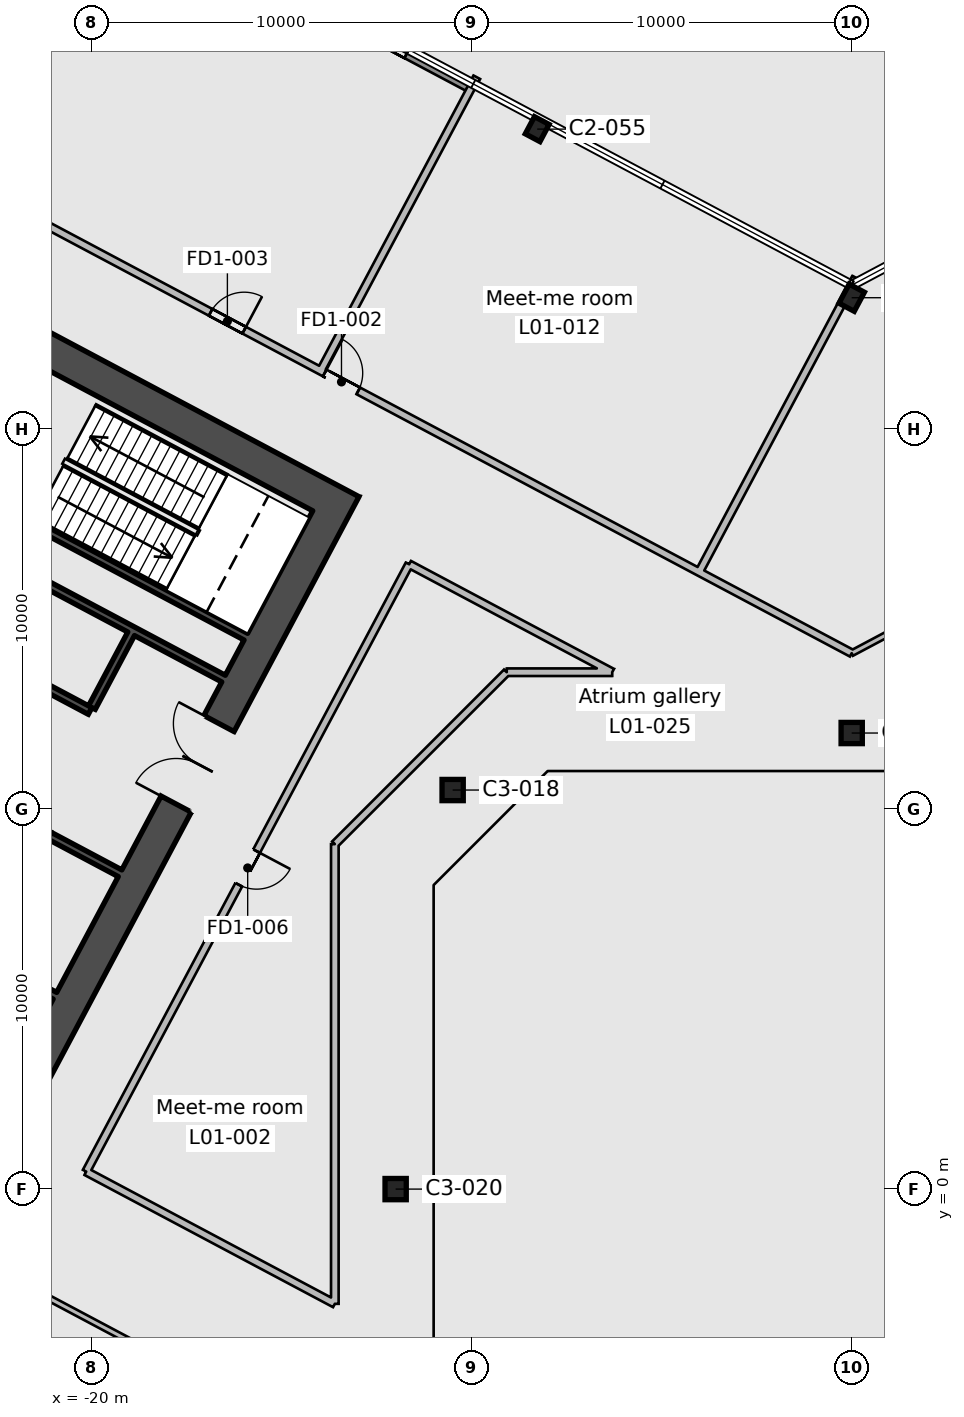
"""IFC4 building model, lengths in metres.
Left out: names, types, materials, properties, quantities, classifications, styles, units other than length and angle.
Written with IfcOpenShell. Run it as: python <this file> out.ifc"""

import sys

from ifc_helpers import new_model, si_unit, direction, frame, frame_2d, origin, origin_2d, place, context, subcontext, project, spatial, rectangle, hollow_rectangle, i_section, extrude, element, fill, save


model = new_model("IFC4")
c1 = context("Model", 3, precision=1e-05, world=origin(), true_north=direction((0.0, 1.0)))
c2 = subcontext(c1, "Body", "Model", "MODEL_VIEW")
j1 = project(units=[si_unit("LENGTHUNIT", "METRE"), si_unit("PLANEANGLEUNIT", "RADIAN")], contexts=[c1])
p1 = place(None, origin())
s1 = spatial("IfcSite", under=j1, at=p1, CompositionType="ELEMENT")
p2 = place(p1, origin())
s2 = spatial("IfcBuilding", under=s1, at=p2, CompositionType="ELEMENT")
p3 = place(p2, frame((0.0, 0.0, 7.0)))
s3 = spatial("IfcBuildingStorey", under=s2, at=p3, CompositionType="ELEMENT", Elevation=7.0)
for number, where, z_axis, x_axis in (
    (1, (-12.0, 0.0, 0.0), (0.0, 0.0, 1.0), (1.0, 0.0, 0.0)),
    (2, (-10.5, 10.5, 0.0), (0.0, 0.0, 1.0), (1.0, 0.0, 0.0)),
    (3, (0.0, 12.0, 0.0), (0.0, 0.0, 1.0), (1.0, 0.0, 0.0)),
):
    element("IfcColumn", number, at=place(p3, frame(where, z_axis=z_axis, x_axis=x_axis)), inside=s3, PredefinedType="COLUMN", context=c2, shape_type="SweptSolid", body=[
        extrude(hollow_rectangle(XDim=0.559, YDim=0.559, WallThickness=0.024, InnerFilletRadius=0.012, OuterFilletRadius=0.035, at=origin_2d()), origin(), (0.0, 0.0, 1.0), 5.2),
    ])
p4 = place(p3, frame((0.0, 23.454, 0.0), z_axis=(0.0, 0.0, 1.0), x_axis=(-0.882947592859, 0.469471562786, 0.0)))
e4 = element("IfcColumn", 4, at=p4, inside=s3, PredefinedType="COLUMN", context=c2, shape_type="SweptSolid", body=[
    extrude(i_section(OverallWidth=0.455, OverallDepth=0.569, WebThickness=0.078, FlangeThickness=0.125, FilletRadius=0.015, at=origin_2d()), origin(), (0.0, 0.0, 1.0), 5.2),
])
p5 = place(p3, frame((-8.275, 27.89, 0.0), z_axis=(0.0, 0.0, 1.0), x_axis=(-0.882947592859, 0.469471562786, 0.0)))
e5 = element("IfcColumn", 5, at=p5, inside=s3, PredefinedType="COLUMN", context=c2, shape_type="SweptSolid", body=[
    extrude(i_section(OverallWidth=0.437, OverallDepth=0.513, WebThickness=0.061, FlangeThickness=0.097, FilletRadius=0.015, at=origin_2d()), origin(), (0.0, 0.0, 1.0), 5.2),
])
p6 = place(p3, frame((-13.362, 18.43, 0.0), z_axis=(0.0, 0.0, 1.0), x_axis=(-0.46947084998, -0.882947971864, 0.0)))
e6 = element("IfcWall", 6, at=p6, inside=s3, PredefinedType="SHEAR", context=c2, shape_type="SweptSolid", body=[
    extrude(rectangle(XDim=20.0, YDim=0.9, at=frame_2d((10.0, 0.0))), origin(), (0.0, 0.0, 1.0), 5.2),
])
p7 = place(p6, frame((7.0, 0.0, 0.0)))
e7 = element("IfcOpeningElement", 7, at=p7, cuts=e6, PredefinedType="OPENING", context=c2, shape_type="SweptSolid", body=[
    extrude(rectangle(XDim=2.4, YDim=2.4, at=frame_2d((1.2, 1.2))), frame((0.0, 0.46, 0.0), z_axis=(0.0, -1.0, 0.0), x_axis=(1.0, 0.0, 0.0)), (0.0, 0.0, 1.0), 0.92),
])
p8 = place(p3, frame((-13.97, 18.244, 0.0), z_axis=(0.0, 0.0, 1.0), x_axis=(-0.88294509198, 0.469476266226, 0.0)))
e8 = element("IfcWall", 8, at=p8, inside=s3, PredefinedType="SHEAR", context=c2, shape_type="SweptSolid", body=[
    extrude(rectangle(XDim=20.2, YDim=0.9, at=frame_2d((10.1, 0.0))), origin(), (0.0, 0.0, 1.0), 5.2),
])
p9 = place(p3, frame((-18.96, 14.611, 0.0), z_axis=(0.0, 0.0, 1.0), x_axis=(-0.4694473164, -0.882960484464, 0.0)))
e9 = element("IfcWall", 9, at=p9, inside=s3, PredefinedType="SHEAR", context=c2, shape_type="SweptSolid", body=[
    extrude(rectangle(XDim=2.2, YDim=0.2, at=frame_2d((1.1, 0.0))), origin(), (0.0, 0.0, 1.0), 5.2),
])
p10 = place(p3, frame((-15.942, 14.536, 0.0), z_axis=(0.0, 0.0, 1.0), x_axis=(-0.882946947542, 0.469472776449, 0.0)))
e10 = element("IfcWall", 10, at=p10, inside=s3, PredefinedType="SHEAR", context=c2, shape_type="SweptSolid", body=[
    extrude(rectangle(XDim=8.0, YDim=0.2, at=frame_2d((4.0, 0.0))), origin(), (0.0, 0.0, 1.0), 5.2),
])
p11 = place(p3, frame((-16.529, 13.432, 0.0), z_axis=(0.0, 0.0, 1.0), x_axis=(-0.88295287151, 0.469461634952, 0.0)))
e11 = element("IfcWall", 11, at=p11, inside=s3, PredefinedType="SHEAR", context=c2, shape_type="SweptSolid", body=[
    extrude(rectangle(XDim=8.0, YDim=0.2, at=frame_2d((4.0, 0.0))), origin(), (0.0, 0.0, 1.0), 5.2),
])
p12 = place(p3, frame((-20.04, 12.581, 0.0), z_axis=(0.0, 0.0, 1.0), x_axis=(-0.882942972946, 0.469480251476, 0.0)))
e12 = element("IfcWall", 12, at=p12, inside=s3, PredefinedType="SHEAR", context=c2, shape_type="SweptSolid", body=[
    extrude(rectangle(XDim=5.4, YDim=0.2, at=frame_2d((2.7, 0.0))), origin(), (0.0, 0.0, 1.0), 5.2),
])
p13 = place(p12, frame((2.25, 0.0, 0.0)))
e13 = element("IfcOpeningElement", 13, at=p13, cuts=e12, PredefinedType="OPENING", context=c2, shape_type="SweptSolid", body=[
    extrude(rectangle(XDim=0.9, YDim=2.1, at=frame_2d((0.45, 1.05))), frame((0.0, 0.11, 0.0), z_axis=(0.0, -1.0, 0.0), x_axis=(1.0, 0.0, 0.0)), (0.0, 0.0, 1.0), 0.22),
])
p14 = place(p3, frame((-19.252, 8.311, 0.0), z_axis=(0.0, 0.0, 1.0), x_axis=(-0.882955722218, 0.469456273365, 0.0)))
e14 = element("IfcWall", 14, at=p14, inside=s3, PredefinedType="SHEAR", context=c2, shape_type="SweptSolid", body=[
    extrude(rectangle(XDim=10.0, YDim=0.2, at=frame_2d((5.0, 0.0))), origin(), (0.0, 0.0, 1.0), 5.2),
])
p15 = place(p14, frame((2.1, 0.0, 0.0)))
e15 = element("IfcOpeningElement", 15, at=p15, cuts=e14, PredefinedType="OPENING", context=c2, shape_type="SweptSolid", body=[
    extrude(rectangle(XDim=1.2, YDim=2.1, at=frame_2d((0.6, 1.05))), frame((0.0, 0.11, 0.0), z_axis=(0.0, -1.0, 0.0), x_axis=(1.0, 0.0, 0.0)), (0.0, 0.0, 1.0), 0.22),
])
p16 = place(p3, frame((-20.965, 5.088, 0.0), z_axis=(0.0, 0.0, 1.0), x_axis=(-0.882925986334, 0.469512196493, 0.0)))
e16 = element("IfcWall", 16, at=p16, inside=s3, PredefinedType="SHEAR", context=c2, shape_type="SweptSolid", body=[
    extrude(rectangle(XDim=4.5, YDim=0.2, at=frame_2d((2.25, 0.0))), origin(), (0.0, 0.0, 1.0), 5.2),
])
p17 = place(p16, frame((0.6, 0.0, 0.0)))
e17 = element("IfcOpeningElement", 17, at=p17, cuts=e16, PredefinedType="OPENING", context=c2, shape_type="SweptSolid", body=[
    extrude(rectangle(XDim=1.1, YDim=2.1, at=frame_2d((0.55, 1.05))), frame((0.0, 0.11, 0.0), z_axis=(0.0, -1.0, 0.0), x_axis=(1.0, 0.0, 0.0)), (0.0, 0.0, 1.0), 0.22),
])
p18 = place(p3, frame((-10.017, 28.968, 0.0), z_axis=(0.0, 0.0, 1.0), x_axis=(-0.882941888563, 0.469482290849, 0.0)))
e18 = element("IfcWall", 18, at=p18, inside=s3, PredefinedType="STANDARD", context=c2, shape_type="SweptSolid", body=[
    extrude(rectangle(XDim=5.639, YDim=0.25, at=frame_2d((2.82, 0.0))), origin(), (0.0, 0.0, 1.0), 3.612),
])
p19 = place(p18, frame((1.919, 0.0, 0.0)))
e19 = element("IfcOpeningElement", 19, at=p19, cuts=e18, PredefinedType="OPENING", context=c2, shape_type="SweptSolid", body=[
    extrude(rectangle(XDim=1.8, YDim=2.4, at=frame_2d((0.9, 1.2))), frame((0.0, 0.135, 0.0), z_axis=(0.0, -1.0, 0.0), x_axis=(1.0, 0.0, 0.0)), (0.0, 0.0, 1.0), 0.27),
])
p20 = place(p3, frame((-13.6, -6.869, 0.0), z_axis=(0.0, 0.0, 1.0), x_axis=(-0.88295406426, 0.469459391648, 0.0)))
e20 = element("IfcWall", 20, at=p20, inside=s3, PredefinedType="PARTITIONING", context=c2, shape_type="SweptSolid", body=[
    extrude(rectangle(XDim=35.091, YDim=0.15, at=frame_2d((17.545, 0.0))), origin(), (0.0, 0.0, 1.0), 4.75),
])
p21 = place(p20, frame((25.75, 0.0, 0.0)))
e21 = element("IfcOpeningElement", 21, at=p21, cuts=e20, PredefinedType="OPENING", context=c2, shape_type="SweptSolid", body=[
    extrude(rectangle(XDim=1.0, YDim=2.1, at=frame_2d((0.5, 1.05))), frame((0.0, 0.085, 0.0), z_axis=(0.0, -1.0, 0.0), x_axis=(1.0, 0.0, 0.0)), (0.0, 0.0, 1.0), 0.17),
])
p22 = place(p20, frame((17.05, 0.0, 0.0)))
e22 = element("IfcOpeningElement", 22, at=p22, cuts=e20, PredefinedType="OPENING", context=c2, shape_type="SweptSolid", body=[
    extrude(rectangle(XDim=1.0, YDim=2.1, at=frame_2d((0.5, 1.05))), frame((0.0, 0.085, 0.0), z_axis=(0.0, -1.0, 0.0), x_axis=(1.0, 0.0, 0.0)), (0.0, 0.0, 1.0), 0.17),
])
p23 = place(p3, frame((-32.894, 31.59, 0.0), z_axis=(0.0, 0.0, 1.0), x_axis=(0.882948512555, -0.469469833085, 0.0)))
e23 = element("IfcWall", 23, at=p23, inside=s3, PredefinedType="PARTITIONING", context=c2, shape_type="SweptSolid", body=[
    extrude(rectangle(XDim=37.255, YDim=0.2, at=frame_2d((18.627, 0.0))), origin(), (0.0, 0.0, 1.0), 4.75),
])
p24 = place(p23, frame((21.55, 0.0, 0.0)))
e24 = element("IfcOpeningElement", 24, at=p24, cuts=e23, PredefinedType="OPENING", context=c2, shape_type="SweptSolid", body=[
    extrude(rectangle(XDim=1.0, YDim=2.1, at=frame_2d((0.5, 1.05))), frame((0.0, 0.11, 0.0), z_axis=(0.0, -1.0, 0.0), x_axis=(1.0, 0.0, 0.0)), (0.0, 0.0, 1.0), 0.22),
])
p25 = place(p23, frame((18.15, 0.0, 0.0)))
e25 = element("IfcOpeningElement", 25, at=p25, cuts=e23, PredefinedType="OPENING", context=c2, shape_type="SweptSolid", body=[
    extrude(rectangle(XDim=1.0, YDim=2.1, at=frame_2d((0.5, 1.05))), frame((0.0, 0.11, 0.0), z_axis=(0.0, -1.0, 0.0), x_axis=(1.0, 0.0, 0.0)), (0.0, 0.0, 1.0), 0.22),
])
p26 = place(p3, frame((0.0, 14.1, 0.0), z_axis=(0.0, 0.0, 1.0), x_axis=(0.882942713919, 0.469480738623, 0.0)))
e26 = element("IfcWall", 26, at=p26, inside=s3, PredefinedType="PARTITIONING", context=c2, shape_type="SweptSolid", body=[
    extrude(rectangle(XDim=36.591, YDim=0.15, at=frame_2d((18.296, 0.0))), origin(), (0.0, 0.0, 1.0), 4.75),
])
p27 = place(p26, frame((30.95, 0.0, 0.0)))
e27 = element("IfcOpeningElement", 27, at=p27, cuts=e26, PredefinedType="OPENING", context=c2, shape_type="SweptSolid", body=[
    extrude(rectangle(XDim=1.0, YDim=2.1, at=frame_2d((0.5, 1.05))), frame((0.0, 0.085, 0.0), z_axis=(0.0, -1.0, 0.0), x_axis=(1.0, 0.0, 0.0)), (0.0, 0.0, 1.0), 0.17),
])
p28 = place(p26, frame((20.45, 0.0, 0.0)))
e28 = element("IfcOpeningElement", 28, at=p28, cuts=e26, PredefinedType="OPENING", context=c2, shape_type="SweptSolid", body=[
    extrude(rectangle(XDim=1.0, YDim=2.1, at=frame_2d((0.5, 1.05))), frame((0.0, 0.085, 0.0), z_axis=(0.0, -1.0, 0.0), x_axis=(1.0, 0.0, 0.0)), (0.0, 0.0, 1.0), 0.17),
])
p29 = place(p26, frame((17.75, 0.0, 0.0)))
e29 = element("IfcOpeningElement", 29, at=p29, cuts=e26, PredefinedType="OPENING", context=c2, shape_type="SweptSolid", body=[
    extrude(rectangle(XDim=1.0, YDim=2.1, at=frame_2d((0.5, 1.05))), frame((0.0, 0.085, 0.0), z_axis=(0.0, -1.0, 0.0), x_axis=(1.0, 0.0, 0.0)), (0.0, 0.0, 1.0), 0.17),
])
p30 = place(p3, frame((-9.864, 29.255, 0.0), z_axis=(0.0, 0.0, 1.0), x_axis=(-0.469472759909, -0.882946956336, 0.0)))
e30 = element("IfcWall", 30, at=p30, inside=s3, PredefinedType="PARTITIONING", context=c2, shape_type="SweptSolid", body=[
    extrude(rectangle(XDim=8.75, YDim=0.2, at=frame_2d((4.375, 0.0))), origin(), (0.0, 0.0, 1.0), 4.75),
])
p31 = place(p3, frame((-20.142, 0.46, 0.0), z_axis=(0.0, 0.0, 1.0), x_axis=(0.469506937019, 0.882928783136, 0.0)))
e31 = element("IfcWall", 31, at=p31, inside=s3, PredefinedType="PARTITIONING", context=c2, shape_type="SweptSolid", body=[
    extrude(rectangle(XDim=18.1, YDim=0.2, at=frame_2d((9.05, 0.0))), origin(), (0.0, 0.0, 1.0), 4.75),
])
p32 = place(p31, frame((8.55, 0.0, 0.0)))
e32 = element("IfcOpeningElement", 32, at=p32, cuts=e31, PredefinedType="OPENING", context=c2, shape_type="SweptSolid", body=[
    extrude(rectangle(XDim=1.0, YDim=2.1, at=frame_2d((0.5, 1.05))), frame((0.0, 0.11, 0.0), z_axis=(0.0, -1.0, 0.0), x_axis=(1.0, 0.0, 0.0)), (0.0, 0.0, 1.0), 0.22),
])
p33 = place(p3, frame((-11.644, 16.441, 0.0), z_axis=(0.0, 0.0, 1.0), x_axis=(0.882853947977, -0.469647640834, 0.0)))
e33 = element("IfcWall", 33, at=p33, inside=s3, PredefinedType="PARTITIONING", context=c2, shape_type="SweptSolid", body=[
    extrude(rectangle(XDim=3.153, YDim=0.2, at=frame_2d((1.577, 0.0))), origin(), (0.0, 0.0, 1.0), 4.75),
])
p34 = place(p3, frame((-13.6, -3.019, 0.0), z_axis=(0.0, 0.0, 1.0), x_axis=(-0.882915984826, 0.469531004022, 0.0)))
e34 = element("IfcWall", 34, at=p34, inside=s3, PredefinedType="PARTITIONING", context=c2, shape_type="SweptSolid", body=[
    extrude(rectangle(XDim=7.409, YDim=0.2, at=frame_2d((3.705, 0.0))), origin(), (0.0, 0.0, 1.0), 4.75),
])
p35 = place(p3, frame((-13.6, 9.077, 0.0), z_axis=(0.0, 0.0, 1.0), x_axis=(0.0, -1.0, 0.0)))
e35 = element("IfcWall", 35, at=p35, inside=s3, PredefinedType="PARTITIONING", context=c2, shape_type="SweptSolid", body=[
    extrude(rectangle(XDim=12.096, YDim=0.2, at=frame_2d((6.048, 0.0))), origin(), (0.0, 0.0, 1.0), 4.75),
])
p36 = place(p3, frame((-13.6, 9.077, 0.0), z_axis=(0.0, 0.0, 1.0), x_axis=(0.707106781187, 0.707106781187, 0.0)))
e36 = element("IfcWall", 36, at=p36, inside=s3, PredefinedType="PARTITIONING", context=c2, shape_type="SweptSolid", body=[
    extrude(rectangle(XDim=6.397, YDim=0.2, at=frame_2d((3.198, 0.0))), origin(), (0.0, 0.0, 1.0), 4.75),
])
p37 = place(p3, frame((0.105, 23.984, 0.0), z_axis=(0.0, 0.0, 1.0), x_axis=(-0.469364726907, -0.883004390213, 0.0)))
e37 = element("IfcWall", 37, at=p37, inside=s3, PredefinedType="PARTITIONING", context=c2, shape_type="SweptSolid", body=[
    extrude(rectangle(XDim=8.775, YDim=0.2, at=frame_2d((4.388, 0.0))), origin(), (0.0, 0.0, 1.0), 4.75),
])
p38 = place(p3, frame((-6.301, 13.6, 0.0), z_axis=(0.0, 0.0, 1.0), x_axis=(-1.0, 0.0, 0.0)))
e38 = element("IfcWall", 38, at=p38, inside=s3, PredefinedType="PARTITIONING", context=c2, shape_type="SweptSolid", body=[
    extrude(rectangle(XDim=2.776, YDim=0.2, at=frame_2d((1.388, 0.0))), origin(), (0.0, 0.0, 1.0), 4.75),
])
p39 = place(p3, frame((-6.301, 13.6, 0.0), z_axis=(0.0, 0.0, 1.0), x_axis=(-0.883065539011, 0.469249671083, 0.0)))
e39 = element("IfcWall", 39, at=p39, inside=s3, PredefinedType="PARTITIONING", context=c2, shape_type="SweptSolid", body=[
    extrude(rectangle(XDim=2.898, YDim=0.2, at=frame_2d((1.449, 0.0))), origin(), (0.0, 0.0, 1.0), 4.75),
])
p40 = place(p7, frame((2.4, 0.0, 0.0), z_axis=(0.0, 0.0, 1.0), x_axis=(-1.0, 0.0, 0.0)))
e40 = element("IfcDoor", 40, at=p40, inside=s3, OperationType="DOUBLE_DOOR_SINGLE_SWING", PredefinedType="DOOR", context=c2, shape_type="SweptSolid", body=[
    extrude(rectangle(XDim=2.4, YDim=2.4, at=frame_2d((1.2, 1.2))), frame((0.0, 0.025, 0.0), z_axis=(0.0, -1.0, 0.0), x_axis=(1.0, 0.0, 0.0)), (0.0, 0.0, 1.0), 0.05),
])
fill(e7, e40)
p41 = place(p19, frame((1.8, 0.0, 0.0), z_axis=(0.0, 0.0, 1.0), x_axis=(-1.0, 0.0, 0.0)))
e41 = element("IfcDoor", 41, at=p41, inside=s3, OperationType="DOUBLE_DOOR_SINGLE_SWING", PredefinedType="DOOR", context=c2, shape_type="SweptSolid", body=[
    extrude(rectangle(XDim=1.8, YDim=2.4, at=frame_2d((0.9, 1.2))), frame((0.0, 0.025, 0.0), z_axis=(0.0, -1.0, 0.0), x_axis=(1.0, 0.0, 0.0)), (0.0, 0.0, 1.0), 0.05),
])
fill(e19, e41)
p42 = place(p32, frame((1.0, 0.0, 0.0), z_axis=(0.0, 0.0, 1.0), x_axis=(-1.0, 0.0, 0.0)))
e42 = element("IfcDoor", 42, at=p42, inside=s3, OperationType="SINGLE_SWING_LEFT", PredefinedType="DOOR", context=c2, shape_type="SweptSolid", body=[
    extrude(rectangle(XDim=1.0, YDim=2.1, at=frame_2d((0.5, 1.05))), frame((0.0, 0.025, 0.0), z_axis=(0.0, -1.0, 0.0), x_axis=(1.0, 0.0, 0.0)), (0.0, 0.0, 1.0), 0.05),
])
fill(e32, e42)
p43 = place(p24, origin())
e43 = element("IfcDoor", 43, at=p43, inside=s3, OperationType="SINGLE_SWING_LEFT", PredefinedType="DOOR", context=c2, shape_type="SweptSolid", body=[
    extrude(rectangle(XDim=1.0, YDim=2.1, at=frame_2d((0.5, 1.05))), frame((0.0, 0.025, 0.0), z_axis=(0.0, -1.0, 0.0), x_axis=(1.0, 0.0, 0.0)), (0.0, 0.0, 1.0), 0.05),
])
fill(e24, e43)
p44 = place(p25, origin())
e44 = element("IfcDoor", 44, at=p44, inside=s3, OperationType="SINGLE_SWING_RIGHT", PredefinedType="DOOR", context=c2, shape_type="SweptSolid", body=[
    extrude(rectangle(XDim=1.0, YDim=2.1, at=frame_2d((0.5, 1.05))), frame((0.0, 0.025, 0.0), z_axis=(0.0, -1.0, 0.0), x_axis=(1.0, 0.0, 0.0)), (0.0, 0.0, 1.0), 0.05),
])
fill(e25, e44)
save(model, sys.argv[1])
